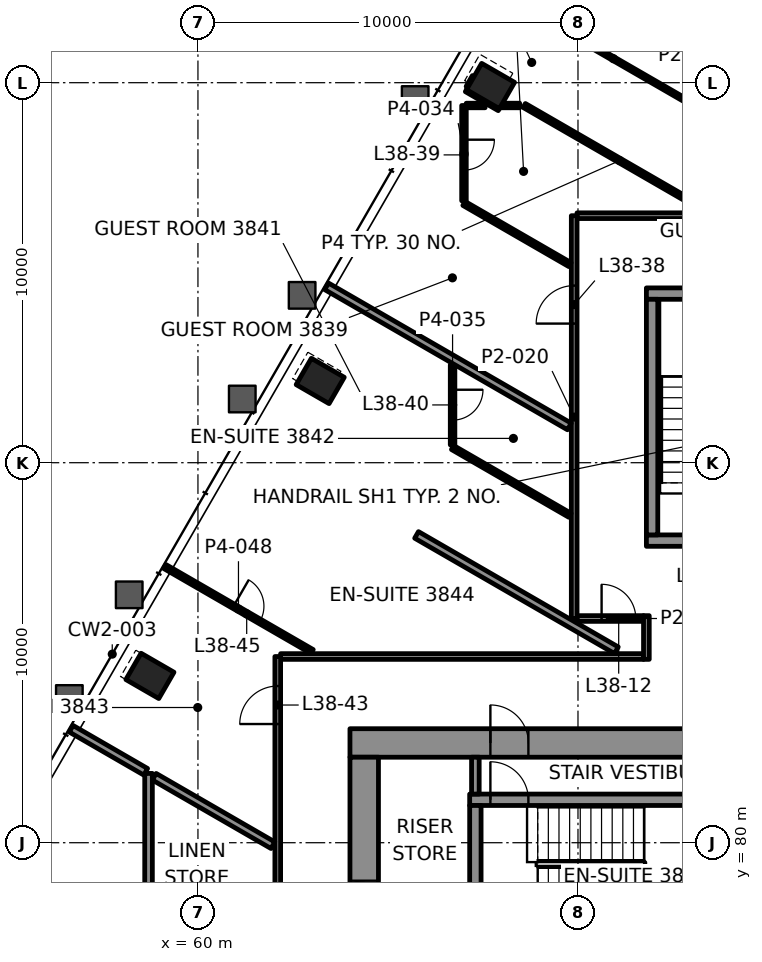
"""IFC4 building model, lengths in metres.
Left out: names, types, materials, properties, quantities, classifications, styles, units other than length and angle.
Written with IfcOpenShell. Run it as: python <this file> out.ifc"""

import sys

from ifc_helpers import new_model, si_unit, direction, frame, frame_2d, origin, origin_2d, place, context, subcontext, project, spatial, rectangle, hollow_rectangle, extrude, element, fill, save


model = new_model("IFC4")
c1 = context("Model", 3, precision=1e-05, world=origin(), true_north=direction((0.0, 1.0)))
c2 = subcontext(c1, "Body", "Model", "MODEL_VIEW")
j1 = project(units=[si_unit("LENGTHUNIT", "METRE"), si_unit("PLANEANGLEUNIT", "RADIAN")], contexts=[c1])
p1 = place(None, origin())
s1 = spatial("IfcSite", under=j1, at=p1, CompositionType="ELEMENT")
p2 = place(p1, origin())
s2 = spatial("IfcBuilding", under=s1, at=p2, CompositionType="ELEMENT")
p3 = place(p2, frame((0.0, 0.0, 167.5)))
s3 = spatial("IfcBuildingStorey", under=s2, at=p3, CompositionType="ELEMENT", Elevation=167.5)
for number, where, z_axis, x_axis in (
    (1, (67.698, 99.912, -0.0), (0.0, 0.0, 1.0), (-0.5, -0.866, 0.0)),
    (2, (63.218, 92.151, -0.0), (0.0, 0.0, 1.0), (-0.5, -0.866, 0.0)),
    (3, (58.737, 84.39, -0.0), (0.0, 0.0, 1.0), (-0.5, -0.866, 0.0)),
):
    element("IfcColumn", number, at=place(p3, frame(where, z_axis=z_axis, x_axis=x_axis)), inside=s3, PredefinedType="COLUMN", context=c2, shape_type="SweptSolid", body=[
        extrude(hollow_rectangle(XDim=0.8, YDim=1.0, WallThickness=0.05, at=origin_2d()), origin(), (0.0, 0.0, 1.0), 3.9),
    ])
p4 = place(p3, frame((64.0, 82.625, 0.0), z_axis=(0.0, 0.0, 1.0), x_axis=(1.0, 0.0, 0.0)))
e4 = element("IfcWall", 4, at=p4, inside=s3, PredefinedType="SHEAR", context=c2, shape_type="SweptSolid", body=[
    extrude(rectangle(XDim=22.0, YDim=0.75, at=frame_2d((11.0, 0.0))), origin(), (0.0, 0.0, 1.0), 3.7),
])
p5 = place(p4, frame((3.695, 0.0, 0.0)))
e5 = element("IfcOpeningElement", 5, at=p5, cuts=e4, PredefinedType="OPENING", context=c2, shape_type="SweptSolid", body=[
    extrude(rectangle(XDim=1.0, YDim=2.1, at=frame_2d((0.5, 1.05))), frame((0.0, 0.385, 0.0), z_axis=(0.0, -1.0, 0.0), x_axis=(1.0, 0.0, 0.0)), (0.0, 0.0, 1.0), 0.77),
])
p6 = place(p4, frame((17.505, 0.0, 0.0)))
e6 = element("IfcOpeningElement", 6, at=p6, cuts=e4, PredefinedType="OPENING", context=c2, shape_type="SweptSolid", body=[
    extrude(rectangle(XDim=1.0, YDim=2.1, at=frame_2d((0.5, 1.05))), frame((0.0, 0.385, 0.0), z_axis=(0.0, -1.0, 0.0), x_axis=(1.0, 0.0, 0.0)), (0.0, 0.0, 1.0), 0.77),
])
p7 = place(p4, frame((10.65, 0.0, 0.0)))
e7 = element("IfcOpeningElement", 7, at=p7, cuts=e4, PredefinedType="OPENING", context=c2, shape_type="SweptSolid", body=[
    extrude(rectangle(XDim=0.9, YDim=2.1, at=frame_2d((0.45, 1.05))), frame((0.0, 0.385, 0.0), z_axis=(0.0, -1.0, 0.0), x_axis=(1.0, 0.0, 0.0)), (0.0, 0.0, 1.0), 0.77),
])
p8 = place(p3, frame((64.375, 67.75, 0.0), z_axis=(0.0, 0.0, 1.0), x_axis=(0.0, 1.0, 0.0)))
e8 = element("IfcWall", 8, at=p8, inside=s3, PredefinedType="SHEAR", context=c2, shape_type="SweptSolid", body=[
    extrude(rectangle(XDim=14.5, YDim=0.75, at=frame_2d((7.25, 0.0))), origin(), (0.0, 0.0, 1.0), 3.7),
])
p9 = place(p8, frame((4.65, 0.0, 0.0)))
e9 = element("IfcOpeningElement", 9, at=p9, cuts=e8, PredefinedType="OPENING", context=c2, shape_type="SweptSolid", body=[
    extrude(rectangle(XDim=1.8, YDim=2.1, at=frame_2d((0.9, 1.05))), frame((0.0, 0.385, 0.0), z_axis=(0.0, -1.0, 0.0), x_axis=(1.0, 0.0, 0.0)), (0.0, 0.0, 1.0), 0.77),
])
p10 = place(p8, frame((2.55, 0.0, 0.0)))
e10 = element("IfcOpeningElement", 10, at=p10, cuts=e8, PredefinedType="OPENING", context=c2, shape_type="SweptSolid", body=[
    extrude(rectangle(XDim=0.9, YDim=2.1, at=frame_2d((0.45, 1.05))), frame((0.0, 0.385, 0.0), z_axis=(0.0, -1.0, 0.0), x_axis=(1.0, 0.0, 0.0)), (0.0, 0.0, 1.0), 0.77),
])
p11 = place(p8, frame((10.35, 0.0, 0.0)))
e11 = element("IfcOpeningElement", 11, at=p11, cuts=e8, PredefinedType="OPENING", context=c2, shape_type="SweptSolid", body=[
    extrude(rectangle(XDim=0.9, YDim=2.1, at=frame_2d((0.45, 1.05))), frame((0.0, 0.385, 0.0), z_axis=(0.0, -1.0, 0.0), x_axis=(1.0, 0.0, 0.0)), (0.0, 0.0, 1.0), 0.77),
])
p12 = place(p3, frame((67.15, 81.13, 0.0), z_axis=(0.0, 0.0, 1.0), x_axis=(1.0, 0.0, 0.0)))
e12 = element("IfcWall", 12, at=p12, inside=s3, PredefinedType="SHEAR", context=c2, shape_type="SweptSolid", body=[
    extrude(rectangle(XDim=6.91, YDim=0.3, at=frame_2d((3.455, 0.0))), origin(), (0.0, 0.0, 1.0), 3.7),
])
p13 = place(p12, frame((0.545, 0.0, 0.0)))
e13 = element("IfcOpeningElement", 13, at=p13, cuts=e12, PredefinedType="OPENING", context=c2, shape_type="SweptSolid", body=[
    extrude(rectangle(XDim=1.0, YDim=2.1, at=frame_2d((0.5, 1.05))), frame((0.0, 0.16, 0.0), z_axis=(0.0, -1.0, 0.0), x_axis=(1.0, 0.0, 0.0)), (0.0, 0.0, 1.0), 0.32),
])
p14 = place(p3, frame((67.3, 77.9, 0.0), z_axis=(0.0, 0.0, 1.0), x_axis=(0.0, 1.0, 0.0)))
e14 = element("IfcWall", 14, at=p14, inside=s3, PredefinedType="SHEAR", context=c2, shape_type="SweptSolid", body=[
    extrude(rectangle(XDim=3.08, YDim=0.3, at=frame_2d((1.54, 0.0))), origin(), (0.0, 0.0, 1.0), 3.7),
])
p15 = place(p3, frame((71.8, 87.95, 0.0), z_axis=(0.0, 0.0, 1.0), x_axis=(1.0, 0.0, 0.0)))
e15 = element("IfcWall", 15, at=p15, inside=s3, PredefinedType="SHEAR", context=c2, shape_type="SweptSolid", body=[
    extrude(rectangle(XDim=6.4, YDim=0.3, at=frame_2d((3.2, 0.0))), origin(), (0.0, 0.0, 1.0), 3.7),
])
p16 = place(p15, frame((1.325, 0.0, 0.0)))
e16 = element("IfcOpeningElement", 16, at=p16, cuts=e15, PredefinedType="OPENING", context=c2, shape_type="SweptSolid", body=[
    extrude(rectangle(XDim=1.0, YDim=2.1, at=frame_2d((0.5, 1.05))), frame((0.0, 0.16, 0.0), z_axis=(0.0, -1.0, 0.0), x_axis=(1.0, 0.0, 0.0)), (0.0, 0.0, 1.0), 0.32),
])
p17 = place(p15, frame((4.125, 0.0, 0.0)))
e17 = element("IfcOpeningElement", 17, at=p17, cuts=e15, PredefinedType="OPENING", context=c2, shape_type="SweptSolid", body=[
    extrude(rectangle(XDim=1.2, YDim=2.1, at=frame_2d((0.6, 1.05))), frame((0.0, 0.16, 0.0), z_axis=(0.0, -1.0, 0.0), x_axis=(1.0, 0.0, 0.0)), (0.0, 0.0, 1.0), 0.32),
])
p18 = place(p3, frame((71.8, 94.45, 0.0), z_axis=(0.0, 0.0, 1.0), x_axis=(1.0, 0.0, 0.0)))
e18 = element("IfcWall", 18, at=p18, inside=s3, PredefinedType="SHEAR", context=c2, shape_type="SweptSolid", body=[
    extrude(rectangle(XDim=6.4, YDim=0.3, at=frame_2d((3.2, 0.0))), origin(), (0.0, 0.0, 1.0), 3.7),
])
p19 = place(p3, frame((71.95, 88.1, 0.0), z_axis=(0.0, 0.0, 1.0), x_axis=(0.0, 1.0, 0.0)))
e19 = element("IfcWall", 19, at=p19, inside=s3, PredefinedType="SHEAR", context=c2, shape_type="SweptSolid", body=[
    extrude(rectangle(XDim=6.2, YDim=0.3, at=frame_2d((3.1, 0.0))), origin(), (0.0, 0.0, 1.0), 3.7),
])
p20 = place(p3, frame((62.176, 84.9, 0.0), z_axis=(0.0, 0.0, 1.0), x_axis=(1.0, 0.0, 0.0)))
e20 = element("IfcWall", 20, at=p20, inside=s3, PredefinedType="PARTITIONING", context=c2, shape_type="SweptSolid", body=[
    extrude(rectangle(XDim=9.55, YDim=0.15, at=frame_2d((4.775, 0.0))), origin(), (0.0, 0.0, 1.0), 3.1),
])
p21 = place(p3, frame((69.976, 85.9, 0.0), z_axis=(0.0, 0.0, 1.0), x_axis=(1.0, 0.0, 0.0)))
e21 = element("IfcWall", 21, at=p21, inside=s3, PredefinedType="PARTITIONING", context=c2, shape_type="SweptSolid", body=[
    extrude(rectangle(XDim=1.75, YDim=0.15, at=frame_2d((0.875, 0.0))), origin(), (0.0, 0.0, 1.0), 3.1),
])
p22 = place(p21, frame((0.646, 0.0, 0.0)))
e22 = element("IfcOpeningElement", 22, at=p22, cuts=e21, PredefinedType="OPENING", context=c2, shape_type="SweptSolid", body=[
    extrude(rectangle(XDim=0.9, YDim=2.1, at=frame_2d((0.45, 1.05))), frame((0.0, 0.085, 0.0), z_axis=(0.0, -1.0, 0.0), x_axis=(1.0, 0.0, 0.0)), (0.0, 0.0, 1.0), 0.17),
])
p23 = place(p3, frame((69.975, 96.5, 0.0), z_axis=(0.0, 0.0, 1.0), x_axis=(1.0, 0.0, 0.0)))
e23 = element("IfcWall", 23, at=p23, inside=s3, PredefinedType="PARTITIONING", context=c2, shape_type="SweptSolid", body=[
    extrude(rectangle(XDim=3.384, YDim=0.15, at=frame_2d((1.692, 0.0))), origin(), (0.0, 0.0, 1.0), 3.1),
])
p24 = place(p3, frame((67.06, 99.4, 0.0), z_axis=(0.0, 0.0, 1.0), x_axis=(1.0, 0.0, 0.0)))
e24 = element("IfcWall", 24, at=p24, inside=s3, PredefinedType="PARTITIONING", context=c2, shape_type="SweptSolid", body=[
    extrude(rectangle(XDim=0.496, YDim=0.12, at=frame_2d((0.248, 0.0))), origin(), (0.0, 0.0, 1.0), 3.022),
])
p25 = place(p3, frame((67.98, 99.4, 0.0), z_axis=(0.0, 0.0, 1.0), x_axis=(1.0, 0.0, 0.0)))
e25 = element("IfcWall", 25, at=p25, inside=s3, PredefinedType="PARTITIONING", context=c2, shape_type="SweptSolid", body=[
    extrude(rectangle(XDim=0.486, YDim=0.12, at=frame_2d((0.243, 0.0))), origin(), (0.0, 0.0, 1.0), 3.1),
])
p26 = place(p3, frame((67.1, 99.877, 0.0), z_axis=(0.0, 0.0, 1.0), x_axis=(0.500277597875, 0.865865073245, 0.0)))
e26 = element("IfcWall", 26, at=p26, inside=s3, PredefinedType="PARTITIONING", context=c2, shape_type="SweptSolid", body=[
    extrude(rectangle(XDim=0.33, YDim=0.1, at=frame_2d((0.165, 0.0))), origin(), (0.0, 0.0, 1.0), 3.1),
])
p27 = place(p3, frame((71.8, 84.825, 0.0), z_axis=(0.0, 0.0, 1.0), x_axis=(0.0, 1.0, 0.0)))
e27 = element("IfcWall", 27, at=p27, inside=s3, PredefinedType="PARTITIONING", context=c2, shape_type="SweptSolid", body=[
    extrude(rectangle(XDim=1.15, YDim=0.15, at=frame_2d((0.575, 0.0))), origin(), (0.0, 0.0, 1.0), 3.1),
])
p28 = place(p3, frame((69.9, 85.9, 0.0), z_axis=(0.0, 0.0, 1.0), x_axis=(0.0, 1.0, 0.0)))
e28 = element("IfcWall", 28, at=p28, inside=s3, PredefinedType="PARTITIONING", context=c2, shape_type="SweptSolid", body=[
    extrude(rectangle(XDim=10.6, YDim=0.15, at=frame_2d((5.3, 0.0))), origin(), (0.0, 0.0, 1.0), 3.022),
])
p29 = place(p28, frame((7.76, 0.0, 0.0)))
e29 = element("IfcOpeningElement", 29, at=p29, cuts=e28, PredefinedType="OPENING", context=c2, shape_type="SweptSolid", body=[
    extrude(rectangle(XDim=1.0, YDim=2.1, at=frame_2d((0.5, 1.05))), frame((0.0, 0.085, 0.0), z_axis=(0.0, -1.0, 0.0), x_axis=(1.0, 0.0, 0.0)), (0.0, 0.0, 1.0), 0.17),
])
p30 = place(p3, frame((67.0, 99.4, 0.0), z_axis=(0.0, 0.0, 1.0), x_axis=(0.0, -1.0, 0.0)))
e30 = element("IfcWall", 30, at=p30, inside=s3, PredefinedType="PARTITIONING", context=c2, shape_type="SweptSolid", body=[
    extrude(rectangle(XDim=2.508, YDim=0.12, at=frame_2d((1.254, 0.0))), origin(), (0.0, 0.0, 1.0), 3.022),
])
p31 = place(p30, frame((0.9, 0.0, 0.0)))
e31 = element("IfcOpeningElement", 31, at=p31, cuts=e30, PredefinedType="OPENING", context=c2, shape_type="SweptSolid", body=[
    extrude(rectangle(XDim=0.8, YDim=2.1, at=frame_2d((0.4, 1.05))), frame((0.0, 0.07, 0.0), z_axis=(0.0, -1.0, 0.0), x_axis=(1.0, 0.0, 0.0)), (0.0, 0.0, 1.0), 0.14),
])
p32 = place(p3, frame((66.7, 92.572, 0.0), z_axis=(0.0, 0.0, 1.0), x_axis=(0.0, -1.0, 0.0)))
e32 = element("IfcWall", 32, at=p32, inside=s3, PredefinedType="PARTITIONING", context=c2, shape_type="SweptSolid", body=[
    extrude(rectangle(XDim=2.104, YDim=0.12, at=frame_2d((1.052, 0.0))), origin(), (0.0, 0.0, 1.0), 3.1),
])
p33 = place(p32, frame((0.652, 0.0, 0.0)))
e33 = element("IfcOpeningElement", 33, at=p33, cuts=e32, PredefinedType="OPENING", context=c2, shape_type="SweptSolid", body=[
    extrude(rectangle(XDim=0.8, YDim=2.1, at=frame_2d((0.4, 1.05))), frame((0.0, 0.07, 0.0), z_axis=(0.0, -1.0, 0.0), x_axis=(1.0, 0.0, 0.0)), (0.0, 0.0, 1.0), 0.14),
])
p34 = place(p3, frame((62.1, 68.591, 0.0), z_axis=(0.0, 0.0, 1.0), x_axis=(0.0, 1.0, 0.0)))
e34 = element("IfcWall", 34, at=p34, inside=s3, PredefinedType="PARTITIONING", context=c2, shape_type="SweptSolid", body=[
    extrude(rectangle(XDim=16.308, YDim=0.15, at=frame_2d((8.154, 0.0))), origin(), (0.0, 0.0, 1.0), 3.1),
])
p35 = place(p34, frame((4.999, 0.0, 0.0)))
e35 = element("IfcOpeningElement", 35, at=p35, cuts=e34, PredefinedType="OPENING", context=c2, shape_type="SweptSolid", body=[
    extrude(rectangle(XDim=0.9, YDim=2.1, at=frame_2d((0.45, 1.05))), frame((0.0, 0.085, 0.0), z_axis=(0.0, -1.0, 0.0), x_axis=(1.0, 0.0, 0.0)), (0.0, 0.0, 1.0), 0.17),
])
p36 = place(p34, frame((8.879, 0.0, 0.0)))
e36 = element("IfcOpeningElement", 36, at=p36, cuts=e34, PredefinedType="OPENING", context=c2, shape_type="SweptSolid", body=[
    extrude(rectangle(XDim=0.9, YDim=2.1, at=frame_2d((0.45, 1.05))), frame((0.0, 0.085, 0.0), z_axis=(0.0, -1.0, 0.0), x_axis=(1.0, 0.0, 0.0)), (0.0, 0.0, 1.0), 0.17),
])
p37 = place(p34, frame((14.532, 0.0, 0.0)))
e37 = element("IfcOpeningElement", 37, at=p37, cuts=e34, PredefinedType="OPENING", context=c2, shape_type="SweptSolid", body=[
    extrude(rectangle(XDim=1.0, YDim=2.1, at=frame_2d((0.5, 1.05))), frame((0.0, 0.085, 0.0), z_axis=(0.0, -1.0, 0.0), x_axis=(1.0, 0.0, 0.0)), (0.0, 0.0, 1.0), 0.17),
])
p38 = place(p3, frame((58.7, 74.063, 0.0), z_axis=(0.0, 0.0, 1.0), x_axis=(0.0, 1.0, 0.0)))
e38 = element("IfcWall", 38, at=p38, inside=s3, PredefinedType="PARTITIONING", context=c2, shape_type="SweptSolid", body=[
    extrude(rectangle(XDim=7.76, YDim=0.2, at=frame_2d((3.88, 0.0))), origin(), (0.0, 0.0, 1.0), 3.1),
])
p39 = place(p3, frame((73.999, 98.862, 0.0), z_axis=(0.0, 0.0, 1.0), x_axis=(-0.866025982437, 0.499998997742, 0.0)))
e39 = element("IfcWall", 39, at=p39, inside=s3, PredefinedType="PARTITIONING", context=c2, shape_type="SweptSolid", body=[
    extrude(rectangle(XDim=7.082, YDim=0.1, at=frame_2d((3.541, 0.0))), origin(), (0.0, 0.0, 1.0), 3.1),
])
p40 = place(p3, frame((73.609, 96.5, 0.0), z_axis=(0.0, 0.0, 1.0), x_axis=(-0.866032775405, 0.499987231761, 0.0)))
e40 = element("IfcWall", 40, at=p40, inside=s3, PredefinedType="PARTITIONING", context=c2, shape_type="SweptSolid", body=[
    extrude(rectangle(XDim=5.8, YDim=0.12, at=frame_2d((2.9, 0.0))), origin(), (0.0, 0.0, 1.0), 3.1),
])
p41 = place(p3, frame((67.932, 99.316, 0.0), z_axis=(0.0, 0.0, 1.0), x_axis=(-0.866010750942, 0.50002537861, 0.0)))
e41 = element("IfcWall", 41, at=p41, inside=s3, PredefinedType="PARTITIONING", context=c2, shape_type="SweptSolid", body=[
    extrude(rectangle(XDim=1.0, YDim=0.12, at=frame_2d((0.5, 0.0))), origin(), (0.0, 0.0, 1.0), 3.022),
])
p42 = place(p3, frame((69.79, 95.212, 0.0), z_axis=(0.0, 0.0, 1.0), x_axis=(-0.86604299788, 0.499969524894, 0.0)))
e42 = element("IfcWall", 42, at=p42, inside=s3, PredefinedType="PARTITIONING", context=c2, shape_type="SweptSolid", body=[
    extrude(rectangle(XDim=3.222, YDim=0.12, at=frame_2d((1.611, 0.0))), origin(), (0.0, 0.0, 1.0), 3.1),
])
p43 = place(p3, frame((69.773, 90.953, 0.0), z_axis=(0.0, 0.0, 1.0), x_axis=(-0.866016371538, 0.500015643983, 0.0)))
e43 = element("IfcWall", 43, at=p43, inside=s3, PredefinedType="PARTITIONING", context=c2, shape_type="SweptSolid", body=[
    extrude(rectangle(XDim=7.376, YDim=0.2, at=frame_2d((3.688, 0.0))), origin(), (0.0, 0.0, 1.0), 3.022),
])
p44 = place(p3, frame((69.791, 88.615, 0.0), z_axis=(0.0, 0.0, 1.0), x_axis=(-0.866045460162, 0.499965259726, 0.0)))
e44 = element("IfcWall", 44, at=p44, inside=s3, PredefinedType="PARTITIONING", context=c2, shape_type="SweptSolid", body=[
    extrude(rectangle(XDim=3.569, YDim=0.12, at=frame_2d((1.784, 0.0))), origin(), (0.0, 0.0, 1.0), 3.1),
])
p45 = place(p3, frame((71.01, 85.065, 0.0), z_axis=(0.0, 0.0, 1.0), x_axis=(-0.866024161028, 0.500002152512, 0.0)))
e45 = element("IfcWall", 45, at=p45, inside=s3, PredefinedType="PARTITIONING", context=c2, shape_type="SweptSolid", body=[
    extrude(rectangle(XDim=6.07, YDim=0.2, at=frame_2d((3.035, 0.0))), origin(), (0.0, 0.0, 1.0), 3.1),
])
p46 = place(p3, frame((59.128, 87.268, 0.0), z_axis=(0.0, 0.0, 1.0), x_axis=(0.866029361473, -0.49999314502, 0.0)))
e46 = element("IfcWall", 46, at=p46, inside=s3, PredefinedType="PARTITIONING", context=c2, shape_type="SweptSolid", body=[
    extrude(rectangle(XDim=4.476, YDim=0.12, at=frame_2d((2.238, 0.0))), origin(), (0.0, 0.0, 1.0), 3.022),
])
p47 = place(p46, frame((2.088, 0.0, 0.0)))
e47 = element("IfcOpeningElement", 47, at=p47, cuts=e46, PredefinedType="OPENING", context=c2, shape_type="SweptSolid", body=[
    extrude(rectangle(XDim=0.8, YDim=2.1, at=frame_2d((0.4, 1.05))), frame((0.0, 0.07, 0.0), z_axis=(0.0, -1.0, 0.0), x_axis=(1.0, 0.0, 0.0)), (0.0, 0.0, 1.0), 0.14),
])
p48 = place(p3, frame((61.973, 79.934, 0.0), z_axis=(0.0, 0.0, 1.0), x_axis=(-0.866022099498, 0.500005723148, 0.0)))
e48 = element("IfcWall", 48, at=p48, inside=s3, PredefinedType="PARTITIONING", context=c2, shape_type="SweptSolid", body=[
    extrude(rectangle(XDim=3.606, YDim=0.2, at=frame_2d((1.803, 0.0))), origin(), (0.0, 0.0, 1.0), 3.1),
])
p49 = place(p3, frame((58.625, 81.867, 0.0), z_axis=(0.0, 0.0, 1.0), x_axis=(-0.866072512627, 0.499918396212, 0.0)))
e49 = element("IfcWall", 49, at=p49, inside=s3, PredefinedType="PARTITIONING", context=c2, shape_type="SweptSolid", body=[
    extrude(rectangle(XDim=2.265, YDim=0.2, at=frame_2d((1.133, 0.0))), origin(), (0.0, 0.0, 1.0), 3.022),
])
p50 = place(p3, frame((67.3, 81.28, 0.0), z_axis=(0.0, 0.0, 1.0), x_axis=(0.0, 1.0, 0.0)))
e50 = element("IfcWall", 50, at=p50, inside=s3, PredefinedType="PARTITIONING", context=c2, shape_type="SweptSolid", body=[
    extrude(rectangle(XDim=0.97, YDim=0.2, at=frame_2d((0.485, 0.0))), origin(), (0.0, 0.0, 1.0), 3.7),
])
p51 = place(p22, origin())
e51 = element("IfcDoor", 51, at=p51, inside=s3, OperationType="SINGLE_SWING_RIGHT", PredefinedType="DOOR", context=c2, shape_type="SweptSolid", body=[
    extrude(rectangle(XDim=0.9, YDim=2.1, at=frame_2d((0.45, 1.05))), frame((0.0, 0.025, 0.0), z_axis=(0.0, -1.0, 0.0), x_axis=(1.0, 0.0, 0.0)), (0.0, 0.0, 1.0), 0.05),
])
fill(e22, e51)
p52 = place(p29, origin())
e52 = element("IfcDoor", 52, at=p52, inside=s3, OperationType="SINGLE_SWING_RIGHT", PredefinedType="DOOR", context=c2, shape_type="SweptSolid", body=[
    extrude(rectangle(XDim=1.0, YDim=2.1, at=frame_2d((0.5, 1.05))), frame((0.0, 0.025, 0.0), z_axis=(0.0, -1.0, 0.0), x_axis=(1.0, 0.0, 0.0)), (0.0, 0.0, 1.0), 0.05),
])
fill(e29, e52)
p53 = place(p31, origin())
e53 = element("IfcDoor", 53, at=p53, inside=s3, OperationType="SINGLE_SWING_RIGHT", PredefinedType="DOOR", context=c2, shape_type="SweptSolid", body=[
    extrude(rectangle(XDim=0.8, YDim=2.1, at=frame_2d((0.4, 1.05))), frame((0.0, 0.025, 0.0), z_axis=(0.0, -1.0, 0.0), x_axis=(1.0, 0.0, 0.0)), (0.0, 0.0, 1.0), 0.05),
])
fill(e31, e53)
p54 = place(p33, origin())
e54 = element("IfcDoor", 54, at=p54, inside=s3, OperationType="SINGLE_SWING_RIGHT", PredefinedType="DOOR", context=c2, shape_type="SweptSolid", body=[
    extrude(rectangle(XDim=0.8, YDim=2.1, at=frame_2d((0.4, 1.05))), frame((0.0, 0.025, 0.0), z_axis=(0.0, -1.0, 0.0), x_axis=(1.0, 0.0, 0.0)), (0.0, 0.0, 1.0), 0.05),
])
fill(e33, e54)
p55 = place(p37, origin())
e55 = element("IfcDoor", 55, at=p55, inside=s3, OperationType="SINGLE_SWING_RIGHT", PredefinedType="DOOR", context=c2, shape_type="SweptSolid", body=[
    extrude(rectangle(XDim=1.0, YDim=2.1, at=frame_2d((0.5, 1.05))), frame((0.0, 0.025, 0.0), z_axis=(0.0, -1.0, 0.0), x_axis=(1.0, 0.0, 0.0)), (0.0, 0.0, 1.0), 0.05),
])
fill(e37, e55)
p56 = place(p47, origin())
e56 = element("IfcDoor", 56, at=p56, inside=s3, OperationType="SINGLE_SWING_RIGHT", PredefinedType="DOOR", context=c2, shape_type="SweptSolid", body=[
    extrude(rectangle(XDim=0.8, YDim=2.1, at=frame_2d((0.4, 1.05))), frame((0.0, 0.025, 0.0), z_axis=(0.0, -1.0, 0.0), x_axis=(1.0, 0.0, 0.0)), (0.0, 0.0, 1.0), 0.05),
])
fill(e47, e56)
p57 = place(p13, origin())
e57 = element("IfcDoor", 57, at=p57, inside=s3, OperationType="SINGLE_SWING_RIGHT", PredefinedType="DOOR", context=c2, shape_type="SweptSolid", body=[
    extrude(rectangle(XDim=1.0, YDim=2.1, at=frame_2d((0.5, 1.05))), frame((0.0, 0.025, 0.0), z_axis=(0.0, -1.0, 0.0), x_axis=(1.0, 0.0, 0.0)), (0.0, 0.0, 1.0), 0.05),
])
fill(e13, e57)
p58 = place(p5, origin())
e58 = element("IfcDoor", 58, at=p58, inside=s3, OperationType="SINGLE_SWING_LEFT", PredefinedType="DOOR", context=c2, shape_type="SweptSolid", body=[
    extrude(rectangle(XDim=1.0, YDim=2.1, at=frame_2d((0.5, 1.05))), frame((0.0, 0.095, 0.0), z_axis=(0.0, -1.0, 0.0), x_axis=(1.0, 0.0, 0.0)), (0.0, 0.0, 1.0), 0.19),
])
fill(e5, e58)
p59 = place(p11, origin())
e59 = element("IfcDoor", 59, at=p59, inside=s3, OperationType="SINGLE_SWING_RIGHT", PredefinedType="DOOR", context=c2, shape_type="SweptSolid", body=[
    extrude(rectangle(XDim=0.9, YDim=2.1, at=frame_2d((0.45, 1.05))), frame((0.0, 0.095, 0.0), z_axis=(0.0, -1.0, 0.0), x_axis=(1.0, 0.0, 0.0)), (0.0, 0.0, 1.0), 0.19),
])
fill(e11, e59)
save(model, sys.argv[1])
